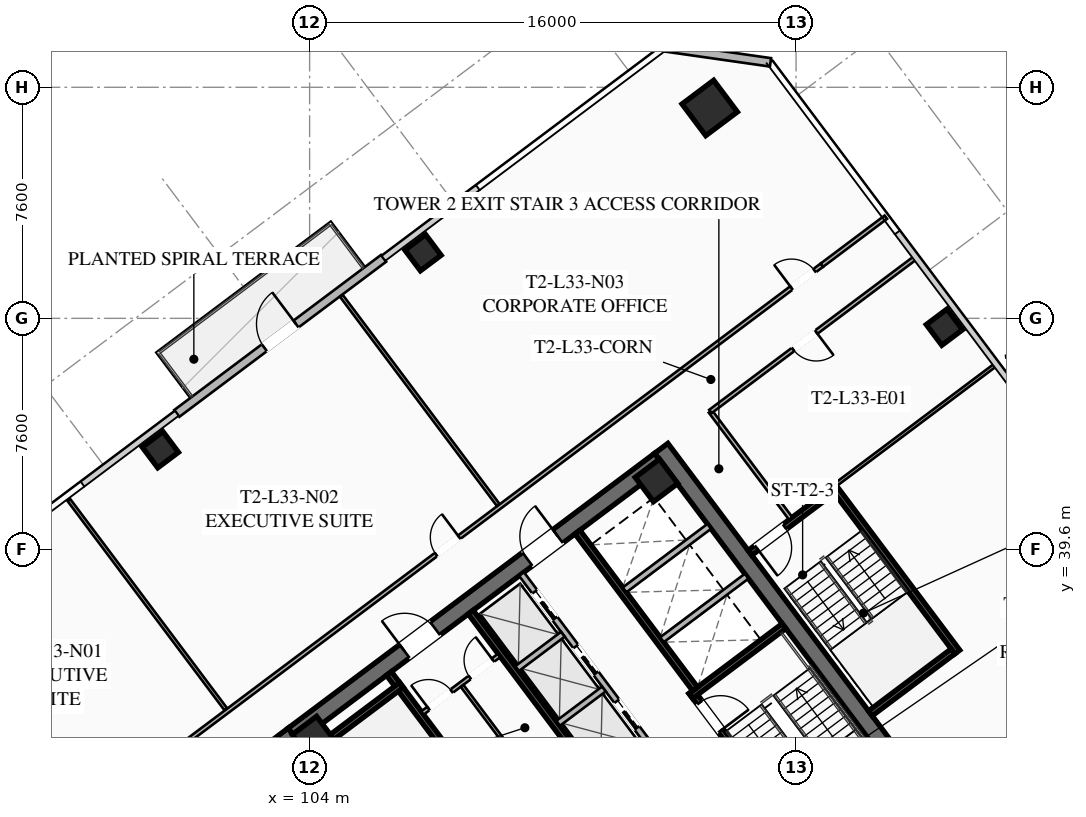
"""IFC4 building model, lengths in metres.
Left out: names, types, materials, properties, quantities, classifications, styles, units other than length and angle.
Written with IfcOpenShell. Run it as: python <this file> out.ifc"""

import sys

from ifc_helpers import new_model, si_unit, direction, frame, frame_2d, origin, origin_2d, place, context, subcontext, project, spatial, rectangle, hollow_rectangle, extrude, element, fill, save


model = new_model("IFC4")
c1 = context("Model", 3, precision=1e-05, world=origin(), true_north=direction((0.0, 1.0)))
c2 = subcontext(c1, "Body", "Model", "MODEL_VIEW")
j1 = project(units=[si_unit("LENGTHUNIT", "METRE"), si_unit("PLANEANGLEUNIT", "RADIAN")], contexts=[c1])
p1 = place(None, origin())
s1 = spatial("IfcSite", under=j1, at=p1, CompositionType="ELEMENT")
p2 = place(p1, origin())
s2 = spatial("IfcBuilding", under=s1, at=p2, CompositionType="ELEMENT")
p3 = place(p2, frame((0.0, 0.0, 125.05)))
s3 = spatial("IfcBuildingStorey", under=s2, at=p3, CompositionType="ELEMENT", Elevation=125.05)
for number, where, z_axis, x_axis in (
    (1, (112.436, 21.077, 0.0), (0.0, 0.0, 1.0), (-0.6, 0.8, 0.0)),
    (2, (115.564, 42.923, 0.0), (0.0, 0.0, 1.0), (0.6, -0.8, 0.0)),
):
    element("IfcWall", number, at=place(p3, frame(where, z_axis=z_axis, x_axis=x_axis)), inside=s3, PredefinedType="SHEAR", context=c2, shape_type="SweptSolid", body=[
        extrude(rectangle(XDim=15.6, YDim=0.55, at=frame_2d((7.8, 0.0))), origin(), (0.0, 0.0, 1.0), 3.55),
    ])
p4 = place(p3, frame((103.461, 33.502, 0.0), z_axis=(0.0, 0.0, 1.0), x_axis=(0.799998054672, 0.600002593761, 0.0)))
e3 = element("IfcWall", 3, at=p4, inside=s3, PredefinedType="SHEAR", context=c2, shape_type="SweptSolid", body=[
    extrude(rectangle(XDim=15.06, YDim=0.55, at=frame_2d((7.53, 0.0))), origin(), (0.0, 0.0, 1.0), 3.55),
])
p5 = place(p4, frame((4.58, 0.0, 0.0)))
e4 = element("IfcOpeningElement", 4, at=p5, cuts=e3, PredefinedType="OPENING", context=c2, shape_type="SweptSolid", body=[
    extrude(rectangle(XDim=1.25, YDim=2.25, at=frame_2d((0.625, 1.125))), frame((0.0, 0.285, 0.0), z_axis=(0.0, -1.0, 0.0), x_axis=(1.0, 0.0, 0.0)), (0.0, 0.0, 1.0), 0.57),
])
p6 = place(p4, frame((9.63, 0.0, 0.0)))
e5 = element("IfcOpeningElement", 5, at=p6, cuts=e3, PredefinedType="OPENING", context=c2, shape_type="SweptSolid", body=[
    extrude(rectangle(XDim=1.25, YDim=2.25, at=frame_2d((0.625, 1.125))), frame((0.0, 0.285, 0.0), z_axis=(0.0, -1.0, 0.0), x_axis=(1.0, 0.0, 0.0)), (0.0, 0.0, 1.0), 0.57),
])
for number, where, z_axis, x_axis in (
    (6, (115.41, 41.87, 0.0), (0.0, 0.0, 1.0), (0.8, 0.6, 0.0)),
    (7, (104.13, 33.41, 0.0), (0.0, 0.0, 1.0), (0.8, 0.6, 0.0)),
):
    element("IfcColumn", number, at=place(p3, frame(where, z_axis=z_axis, x_axis=x_axis)), inside=s3, PredefinedType="COLUMN", context=c2, shape_type="SweptSolid", body=[
        extrude(hollow_rectangle(XDim=1.0, YDim=1.0, WallThickness=0.04, at=origin_2d()), origin(), (0.0, 0.0, 1.0), 3.37),
    ])
p7 = place(p3, frame((117.16, 54.12, 0.0), z_axis=(0.0, 0.0, 1.0), x_axis=(0.799999996291, 0.600000004945, 0.0)))
e8 = element("IfcColumn", 8, at=p7, inside=s3, PredefinedType="COLUMN", context=c2, shape_type="SweptSolid", body=[
    extrude(hollow_rectangle(XDim=1.3, YDim=1.3, WallThickness=0.05, at=origin_2d()), origin(), (0.0, 0.0, 1.0), 3.37),
])
for number, where, z_axis, x_axis in (
    (9, (124.88, 46.91, 0.0), (0.0, 0.0, 1.0), (0.8, 0.6, 0.0)),
    (10, (107.73, 49.36, 0.0), (0.0, 0.0, 1.0), (0.8, 0.6, 0.0)),
    (11, (99.09, 42.88, 0.0), (0.0, 0.0, 1.0), (0.8, 0.6, 0.0)),
):
    element("IfcColumn", number, at=place(p3, frame(where, z_axis=z_axis, x_axis=x_axis)), inside=s3, PredefinedType="COLUMN", context=c2, shape_type="SweptSolid", body=[
        extrude(hollow_rectangle(XDim=0.85, YDim=0.85, WallThickness=0.035, at=origin_2d()), origin(), (0.0, 0.0, 1.0), 3.37),
    ])
p8 = place(p3, frame((99.632, 44.074, 0.0), z_axis=(0.0, 0.0, 1.0), x_axis=(0.799986212866, 0.600018382406, 0.0)))
e12 = element("IfcWall", 12, at=p8, inside=s3, PredefinedType="SOLIDWALL", context=c2, shape_type="SweptSolid", body=[
    extrude(rectangle(XDim=8.5, YDim=0.28, at=frame_2d((4.25, 0.0))), origin(), (0.0, 0.0, 1.0), 3.37),
])
p9 = place(p8, frame((3.6, 0.0, 0.0)))
e13 = element("IfcOpeningElement", 13, at=p9, cuts=e12, PredefinedType="OPENING", context=c2, shape_type="SweptSolid", body=[
    extrude(rectangle(XDim=1.3, YDim=2.15, at=frame_2d((0.65, 1.075))), frame((0.0, 0.15, 0.0), z_axis=(0.0, -1.0, 0.0), x_axis=(1.0, 0.0, 0.0)), (0.0, 0.0, 1.0), 0.3),
])
p10 = place(p3, frame((115.66, 56.12, 0.0), z_axis=(0.0, 0.0, 1.0), x_axis=(0.989949493661, -0.141421356237, 0.0)))
e14 = element("IfcWall", 14, at=p10, inside=s3, PredefinedType="SOLIDWALL", context=c2, shape_type="SweptSolid", body=[
    extrude(rectangle(XDim=3.536, YDim=0.28, at=frame_2d((1.768, 0.0))), origin(), (0.0, 0.0, 1.0), 3.37),
])
p11 = place(p3, frame((111.44, 29.08, 0.0), z_axis=(0.0, 0.0, 1.0), x_axis=(-0.59999029481, 0.8000072788, 0.0)))
e15 = element("IfcWall", 15, at=p11, inside=s3, PredefinedType="SHEAR", context=c2, shape_type="SweptSolid", body=[
    extrude(rectangle(XDim=8.05, YDim=0.2, at=frame_2d((4.025, 0.0))), origin(), (0.0, 0.0, 1.0), 3.37),
])
p12 = place(p11, frame((0.45, 0.0, 0.0)))
e16 = element("IfcOpeningElement", 16, at=p12, cuts=e15, PredefinedType="OPENING", context=c2, shape_type="SweptSolid", body=[
    extrude(rectangle(XDim=1.15, YDim=2.2, at=frame_2d((0.575, 1.1))), frame((0.0, 0.11, 0.0), z_axis=(0.0, -1.0, 0.0), x_axis=(1.0, 0.0, 0.0)), (0.0, 0.0, 1.0), 0.22),
])
p13 = place(p3, frame((103.956, 32.842, 0.0), z_axis=(0.0, 0.0, 1.0), x_axis=(0.800015298837, 0.599979601008, 0.0)))
e17 = element("IfcWall", 17, at=p13, inside=s3, PredefinedType="SHEAR", context=c2, shape_type="SweptSolid", body=[
    extrude(rectangle(XDim=3.83, YDim=0.2, at=frame_2d((1.915, 0.0))), origin(), (0.0, 0.0, 1.0), 3.37),
])
p14 = place(p3, frame((116.56, 34.92, 0.0), z_axis=(0.0, 0.0, 1.0), x_axis=(0.59999029481, -0.8000072788, 0.0)))
e18 = element("IfcWall", 18, at=p14, inside=s3, PredefinedType="SHEAR", context=c2, shape_type="SweptSolid", body=[
    extrude(rectangle(XDim=8.05, YDim=0.2, at=frame_2d((4.025, 0.0))), origin(), (0.0, 0.0, 1.0), 3.37),
])
p15 = place(p14, frame((0.45, 0.0, 0.0)))
e19 = element("IfcOpeningElement", 19, at=p15, cuts=e18, PredefinedType="OPENING", context=c2, shape_type="SweptSolid", body=[
    extrude(rectangle(XDim=1.15, YDim=2.2, at=frame_2d((0.575, 1.1))), frame((0.0, 0.11, 0.0), z_axis=(0.0, -1.0, 0.0), x_axis=(1.0, 0.0, 0.0)), (0.0, 0.0, 1.0), 0.22),
])
p16 = place(p3, frame((116.54, 34.78, 0.0), z_axis=(0.0, 0.0, 1.0), x_axis=(0.800015298837, 0.599979601008, 0.0)))
e20 = element("IfcWall", 20, at=p16, inside=s3, PredefinedType="SHEAR", context=c2, shape_type="SweptSolid", body=[
    extrude(rectangle(XDim=3.83, YDim=0.2, at=frame_2d((1.915, 0.0))), origin(), (0.0, 0.0, 1.0), 3.37),
])
p17 = place(p3, frame((117.998, 25.936, 0.0), z_axis=(0.0, 0.0, 1.0), x_axis=(-0.600002693989, 0.799997979501, 0.0)))
e21 = element("IfcWall", 21, at=p17, inside=s3, PredefinedType="SHEAR", context=c2, shape_type="SweptSolid", body=[
    extrude(rectangle(XDim=14.5, YDim=0.2, at=frame_2d((7.25, 0.0))), origin(), (0.0, 0.0, 1.0), 3.37),
])
p18 = place(p3, frame((112.81, 40.17, 0.0), z_axis=(0.0, 0.0, 1.0), x_axis=(0.599993943644, -0.800004542231, 0.0)))
e22 = element("IfcWall", 22, at=p18, inside=s3, PredefinedType="SHEAR", context=c2, shape_type="SweptSolid", body=[
    extrude(rectangle(XDim=6.45, YDim=0.2, at=frame_2d((3.225, 0.0))), origin(), (0.0, 0.0, 1.0), 3.37),
])
for number, where, z_axis, x_axis in (
    (23, (115.59, 36.63, 0.0), (0.0, 0.0, 1.0), (0.8, 0.6, 0.0)),
    (24, (114.36, 38.27, 0.0), (0.0, 0.0, 1.0), (0.8, 0.6, 0.0)),
):
    element("IfcWall", number, at=place(p3, frame(where, z_axis=z_axis, x_axis=x_axis)), inside=s3, PredefinedType="SOLIDWALL", context=c2, shape_type="SweptSolid", body=[
        extrude(rectangle(XDim=3.48, YDim=0.2, at=frame_2d((1.74, 0.0))), origin(), (0.0, 0.0, 1.0), 3.37),
    ])
p19 = place(p3, frame((107.71, 34.22, 0.0), z_axis=(0.0, 0.0, 1.0), x_axis=(0.799981399002, 0.60002480053, 0.0)))
e25 = element("IfcWall", 25, at=p19, inside=s3, PredefinedType="PARTITIONING", context=c2, shape_type="SweptSolid", body=[
    extrude(rectangle(XDim=3.15, YDim=0.135, at=frame_2d((1.575, 0.0))), origin(), (0.0, 0.0, 1.0), 2.723),
])
p20 = place(p19, frame((0.25, 0.0, 0.0)))
e26 = element("IfcOpeningElement", 26, at=p20, cuts=e25, PredefinedType="OPENING", context=c2, shape_type="SweptSolid", body=[
    extrude(rectangle(XDim=0.95, YDim=2.05, at=frame_2d((0.475, 1.025))), frame((0.0, 0.077, 0.0), z_axis=(0.0, -1.0, 0.0), x_axis=(1.0, 0.0, 0.0)), (0.0, 0.0, 1.0), 0.155),
])
p21 = place(p19, frame((1.95, 0.0, 0.0)))
e27 = element("IfcOpeningElement", 27, at=p21, cuts=e25, PredefinedType="OPENING", context=c2, shape_type="SweptSolid", body=[
    extrude(rectangle(XDim=0.95, YDim=2.05, at=frame_2d((0.475, 1.025))), frame((0.0, 0.077, 0.0), z_axis=(0.0, -1.0, 0.0), x_axis=(1.0, 0.0, 0.0)), (0.0, 0.0, 1.0), 0.155),
])
p22 = place(p3, frame((111.296, 32.072, 0.0), z_axis=(0.0, 0.0, 1.0), x_axis=(-0.59995887973, 0.800030838552, 0.0)))
e28 = element("IfcWall", 28, at=p22, inside=s3, PredefinedType="PARTITIONING", context=c2, shape_type="SweptSolid", body=[
    extrude(rectangle(XDim=3.8, YDim=0.11, at=frame_2d((1.9, 0.0))), origin(), (0.0, 0.0, 1.0), 2.723),
])
p23 = place(p3, frame((115.11, 33.27, 0.0), z_axis=(0.0, 0.0, 1.0), x_axis=(-0.600011322243, 0.799991508192, 0.0)))
e29 = element("IfcWall", 29, at=p23, inside=s3, PredefinedType="SOLIDWALL", context=c2, shape_type="SweptSolid", body=[
    extrude(rectangle(XDim=6.9, YDim=0.2, at=frame_2d((3.45, 0.0))), origin(), (0.0, 0.0, 1.0), 3.37),
])
p24 = place(p23, frame((0.575, 0.0, 0.0)))
e30 = element("IfcOpeningElement", 30, at=p24, cuts=e29, PredefinedType="OPENING", context=c2, shape_type="SweptSolid", body=[
    extrude(rectangle(XDim=1.1, YDim=2.2, at=frame_2d((0.55, 1.1))), frame((0.0, 0.11, 0.0), z_axis=(0.0, -1.0, 0.0), x_axis=(1.0, 0.0, 0.0)), (0.0, 0.0, 1.0), 0.22),
])
p25 = place(p23, frame((2.825, 0.0, 0.0)))
e31 = element("IfcOpeningElement", 31, at=p25, cuts=e29, PredefinedType="OPENING", context=c2, shape_type="SweptSolid", body=[
    extrude(rectangle(XDim=1.1, YDim=2.2, at=frame_2d((0.55, 1.1))), frame((0.0, 0.11, 0.0), z_axis=(0.0, -1.0, 0.0), x_axis=(1.0, 0.0, 0.0)), (0.0, 0.0, 1.0), 0.22),
])
p26 = place(p23, frame((5.075, 0.0, 0.0)))
e32 = element("IfcOpeningElement", 32, at=p26, cuts=e29, PredefinedType="OPENING", context=c2, shape_type="SweptSolid", body=[
    extrude(rectangle(XDim=1.1, YDim=2.2, at=frame_2d((0.55, 1.1))), frame((0.0, 0.11, 0.0), z_axis=(0.0, -1.0, 0.0), x_axis=(1.0, 0.0, 0.0)), (0.0, 0.0, 1.0), 0.22),
])
p27 = place(p3, frame((112.176, 33.882, 0.0), z_axis=(0.0, 0.0, 1.0), x_axis=(0.8, 0.6, 0.0)))
e33 = element("IfcWall", 33, at=p27, inside=s3, PredefinedType="SOLIDWALL", context=c2, shape_type="SweptSolid", body=[
    extrude(rectangle(XDim=1.88, YDim=0.2, at=frame_2d((0.94, 0.0))), origin(), (0.0, 0.0, 1.0), 3.37),
])
p28 = place(p3, frame((110.826, 35.682, 0.0), z_axis=(0.0, 0.0, 1.0), x_axis=(0.799984418148, 0.600020775241, 0.0)))
e34 = element("IfcWall", 34, at=p28, inside=s3, PredefinedType="SOLIDWALL", context=c2, shape_type="SweptSolid", body=[
    extrude(rectangle(XDim=1.88, YDim=0.2, at=frame_2d((0.94, 0.0))), origin(), (0.0, 0.0, 1.0), 3.37),
])
p29 = place(p3, frame((125.304, 36.228, 0.0), z_axis=(0.0, 0.0, 1.0), x_axis=(-0.59998851072, 0.800008616831, 0.0)))
e35 = element("IfcWall", 35, at=p29, inside=s3, PredefinedType="SHEAR", context=c2, shape_type="SweptSolid", body=[
    extrude(rectangle(XDim=6.8, YDim=0.2, at=frame_2d((3.4, 0.0))), origin(), (0.0, 0.0, 1.0), 3.37),
])
p30 = place(p3, frame((121.204, 41.528, 0.0), z_axis=(0.0, 0.0, 1.0), x_axis=(-0.800017232136, -0.599977023131, 0.0)))
e36 = element("IfcWall", 36, at=p30, inside=s3, PredefinedType="SHEAR", context=c2, shape_type="SweptSolid", body=[
    extrude(rectangle(XDim=3.4, YDim=0.2, at=frame_2d((1.7, 0.0))), origin(), (0.0, 0.0, 1.0), 3.37),
])
p31 = place(p30, frame((1.975, 0.0, 0.0)))
e37 = element("IfcOpeningElement", 37, at=p31, cuts=e36, PredefinedType="OPENING", context=c2, shape_type="SweptSolid", body=[
    extrude(rectangle(XDim=1.15, YDim=2.2, at=frame_2d((0.575, 1.1))), frame((0.0, 0.11, 0.0), z_axis=(0.0, -1.0, 0.0), x_axis=(1.0, 0.0, 0.0)), (0.0, 0.0, 1.0), 0.22),
])
p32 = place(p3, frame((122.444, 34.208, 0.0), z_axis=(0.0, 0.0, 1.0), x_axis=(0.79999138319, 0.600011488909, 0.0)))
e38 = element("IfcWall", 38, at=p32, inside=s3, PredefinedType="SHEAR", context=c2, shape_type="SweptSolid", body=[
    extrude(rectangle(XDim=3.4, YDim=0.2, at=frame_2d((1.7, 0.0))), origin(), (0.0, 0.0, 1.0), 3.37),
])
p33 = place(p3, frame((119.824, 40.618, 0.0), z_axis=(0.0, 0.0, 1.0), x_axis=(-0.599982243973, 0.800013316712, 0.0)))
e39 = element("IfcWall", 39, at=p33, inside=s3, PredefinedType="PARTITIONING", context=c2, shape_type="SweptSolid", body=[
    extrude(rectangle(XDim=4.4, YDim=0.135, at=frame_2d((2.2, 0.0))), origin(), (0.0, 0.0, 1.0), 2.723),
])
p34 = place(p3, frame((95.81, 30.17, 0.0), z_axis=(0.0, 0.0, 1.0), x_axis=(0.8, 0.6, 0.0)))
e40 = element("IfcWall", 40, at=p34, inside=s3, PredefinedType="PARTITIONING", context=c2, shape_type="SweptSolid", body=[
    extrude(rectangle(XDim=31.3, YDim=0.135, at=frame_2d((15.65, 0.0))), origin(), (0.0, 0.0, 1.0), 2.723),
])
p35 = place(p34, frame((0.3, 0.0, 0.0)))
e41 = element("IfcOpeningElement", 41, at=p35, cuts=e40, PredefinedType="OPENING", context=c2, shape_type="SweptSolid", body=[
    extrude(rectangle(XDim=0.95, YDim=2.05, at=frame_2d((0.475, 1.025))), frame((0.0, 0.077, 0.0), z_axis=(0.0, -1.0, 0.0), x_axis=(1.0, 0.0, 0.0)), (0.0, 0.0, 1.0), 0.155),
])
p36 = place(p34, frame((15.438, 0.0, 0.0)))
e42 = element("IfcOpeningElement", 42, at=p36, cuts=e40, PredefinedType="OPENING", context=c2, shape_type="SweptSolid", body=[
    extrude(rectangle(XDim=0.95, YDim=2.05, at=frame_2d((0.475, 1.025))), frame((0.0, 0.077, 0.0), z_axis=(0.0, -1.0, 0.0), x_axis=(1.0, 0.0, 0.0)), (0.0, 0.0, 1.0), 0.155),
])
p37 = place(p34, frame((30.05, 0.0, 0.0)))
e43 = element("IfcOpeningElement", 43, at=p37, cuts=e40, PredefinedType="OPENING", context=c2, shape_type="SweptSolid", body=[
    extrude(rectangle(XDim=0.95, YDim=2.05, at=frame_2d((0.475, 1.025))), frame((0.0, 0.077, 0.0), z_axis=(0.0, -1.0, 0.0), x_axis=(1.0, 0.0, 0.0)), (0.0, 0.0, 1.0), 0.155),
])
p38 = place(p3, frame((120.85, 48.95, 0.0), z_axis=(0.0, 0.0, 1.0), x_axis=(0.799977721118, 0.600029704027, 0.0)))
e44 = element("IfcWall", 44, at=p38, inside=s3, PredefinedType="PARTITIONING", context=c2, shape_type="SweptSolid", body=[
    extrude(rectangle(XDim=2.63, YDim=0.135, at=frame_2d((1.315, 0.0))), origin(), (0.0, 0.0, 1.0), 2.723),
])
for number, where, z_axis, x_axis in (
    (45, (101.242, 34.344, 0.0), (0.0, 0.0, 1.0), (-0.6, 0.8, 0.0)),
    (46, (110.202, 41.064, 0.0), (0.0, 0.0, 1.0), (-0.6, 0.8, 0.0)),
):
    element("IfcWall", number, at=place(p3, frame(where, z_axis=z_axis, x_axis=x_axis)), inside=s3, PredefinedType="PARTITIONING", context=c2, shape_type="SweptSolid", body=[
        extrude(rectangle(XDim=8.6, YDim=0.11, at=frame_2d((4.3, 0.0))), origin(), (0.0, 0.0, 1.0), 2.723),
    ])
p39 = place(p3, frame((123.944, 49.208, 0.0), z_axis=(0.0, 0.0, 1.0), x_axis=(-0.799996532921, -0.600004622744, 0.0)))
e47 = element("IfcWall", 47, at=p39, inside=s3, PredefinedType="PARTITIONING", context=c2, shape_type="SweptSolid", body=[
    extrude(rectangle(XDim=8.45, YDim=0.135, at=frame_2d((4.225, 0.0))), origin(), (0.0, 0.0, 1.0), 2.723),
])
p40 = place(p39, frame((4.1, 0.0, 0.0)))
e48 = element("IfcOpeningElement", 48, at=p40, cuts=e47, PredefinedType="OPENING", context=c2, shape_type="SweptSolid", body=[
    extrude(rectangle(XDim=0.95, YDim=2.05, at=frame_2d((0.475, 1.025))), frame((0.0, 0.077, 0.0), z_axis=(0.0, -1.0, 0.0), x_axis=(1.0, 0.0, 0.0)), (0.0, 0.0, 1.0), 0.155),
])
p41 = place(p3, frame((125.208, 30.656, 0.0), z_axis=(0.0, 0.0, 1.0), x_axis=(0.799997105034, 0.600003859935, 0.0)))
e49 = element("IfcWall", 49, at=p41, inside=s3, PredefinedType="PARTITIONING", context=c2, shape_type="SweptSolid", body=[
    extrude(rectangle(XDim=10.12, YDim=0.135, at=frame_2d((5.06, 0.0))), origin(), (0.0, 0.0, 1.0), 2.723),
])
p42 = place(p41, frame((2.045, 0.0, 0.0)))
e50 = element("IfcOpeningElement", 50, at=p42, cuts=e49, PredefinedType="OPENING", context=c2, shape_type="SweptSolid", body=[
    extrude(rectangle(XDim=0.95, YDim=2.05, at=frame_2d((0.475, 1.025))), frame((0.0, 0.077, 0.0), z_axis=(0.0, -1.0, 0.0), x_axis=(1.0, 0.0, 0.0)), (0.0, 0.0, 1.0), 0.155),
])
p43 = place(p3, frame((126.584, 45.688, 0.0), z_axis=(0.0, 0.0, 1.0), x_axis=(-0.800004438899, -0.599994081423, 0.0)))
e51 = element("IfcWall", 51, at=p43, inside=s3, PredefinedType="PARTITIONING", context=c2, shape_type="SweptSolid", body=[
    extrude(rectangle(XDim=6.6, YDim=0.11, at=frame_2d((3.3, 0.0))), origin(), (0.0, 0.0, 1.0), 2.723),
])
p44 = place(p9, origin())
e52 = element("IfcDoor", 52, at=p44, inside=s3, OperationType="SINGLE_SWING_RIGHT", PredefinedType="DOOR", context=c2, shape_type="SweptSolid", body=[
    extrude(rectangle(XDim=1.3, YDim=2.15, at=frame_2d((0.65, 1.075))), frame((0.0, 0.025, 0.0), z_axis=(0.0, -1.0, 0.0), x_axis=(1.0, 0.0, 0.0)), (0.0, 0.0, 1.0), 0.05),
])
fill(e13, e52)
p45 = place(p5, origin())
e53 = element("IfcDoor", 53, at=p45, inside=s3, OperationType="SINGLE_SWING_LEFT", PredefinedType="DOOR", context=c2, shape_type="SweptSolid", body=[
    extrude(rectangle(XDim=1.25, YDim=2.25, at=frame_2d((0.625, 1.125))), frame((0.0, 0.025, 0.0), z_axis=(0.0, -1.0, 0.0), x_axis=(1.0, 0.0, 0.0)), (0.0, 0.0, 1.0), 0.05),
])
fill(e4, e53)
p46 = place(p6, origin())
e54 = element("IfcDoor", 54, at=p46, inside=s3, OperationType="SINGLE_SWING_RIGHT", PredefinedType="DOOR", context=c2, shape_type="SweptSolid", body=[
    extrude(rectangle(XDim=1.25, YDim=2.25, at=frame_2d((0.625, 1.125))), frame((0.0, 0.025, 0.0), z_axis=(0.0, -1.0, 0.0), x_axis=(1.0, 0.0, 0.0)), (0.0, 0.0, 1.0), 0.05),
])
fill(e5, e54)
p47 = place(p15, origin())
e55 = element("IfcDoor", 55, at=p47, inside=s3, OperationType="SINGLE_SWING_RIGHT", PredefinedType="DOOR", context=c2, shape_type="SweptSolid", body=[
    extrude(rectangle(XDim=1.15, YDim=2.2, at=frame_2d((0.575, 1.1))), frame((0.0, 0.025, 0.0), z_axis=(0.0, -1.0, 0.0), x_axis=(1.0, 0.0, 0.0)), (0.0, 0.0, 1.0), 0.05),
])
fill(e19, e55)
p48 = place(p20, origin())
e56 = element("IfcDoor", 56, at=p48, inside=s3, OperationType="SINGLE_SWING_LEFT", PredefinedType="DOOR", context=c2, shape_type="SweptSolid", body=[
    extrude(rectangle(XDim=0.95, YDim=2.05, at=frame_2d((0.475, 1.025))), frame((0.0, 0.025, 0.0), z_axis=(0.0, -1.0, 0.0), x_axis=(1.0, 0.0, 0.0)), (0.0, 0.0, 1.0), 0.05),
])
fill(e26, e56)
p49 = place(p21, origin())
e57 = element("IfcDoor", 57, at=p49, inside=s3, OperationType="SINGLE_SWING_RIGHT", PredefinedType="DOOR", context=c2, shape_type="SweptSolid", body=[
    extrude(rectangle(XDim=0.95, YDim=2.05, at=frame_2d((0.475, 1.025))), frame((0.0, 0.025, 0.0), z_axis=(0.0, -1.0, 0.0), x_axis=(1.0, 0.0, 0.0)), (0.0, 0.0, 1.0), 0.05),
])
fill(e27, e57)
p50 = place(p31, origin())
e58 = element("IfcDoor", 58, at=p50, inside=s3, OperationType="SINGLE_SWING_RIGHT", PredefinedType="DOOR", context=c2, shape_type="SweptSolid", body=[
    extrude(rectangle(XDim=1.15, YDim=2.2, at=frame_2d((0.575, 1.1))), frame((0.0, 0.025, 0.0), z_axis=(0.0, -1.0, 0.0), x_axis=(1.0, 0.0, 0.0)), (0.0, 0.0, 1.0), 0.05),
])
fill(e37, e58)
p51 = place(p36, origin())
e59 = element("IfcDoor", 59, at=p51, inside=s3, OperationType="SINGLE_SWING_RIGHT", PredefinedType="DOOR", context=c2, shape_type="SweptSolid", body=[
    extrude(rectangle(XDim=0.95, YDim=2.05, at=frame_2d((0.475, 1.025))), frame((0.0, 0.025, 0.0), z_axis=(0.0, -1.0, 0.0), x_axis=(1.0, 0.0, 0.0)), (0.0, 0.0, 1.0), 0.05),
])
fill(e42, e59)
p52 = place(p37, origin())
e60 = element("IfcDoor", 60, at=p52, inside=s3, OperationType="SINGLE_SWING_LEFT", PredefinedType="DOOR", context=c2, shape_type="SweptSolid", body=[
    extrude(rectangle(XDim=0.95, YDim=2.05, at=frame_2d((0.475, 1.025))), frame((0.0, 0.025, 0.0), z_axis=(0.0, -1.0, 0.0), x_axis=(1.0, 0.0, 0.0)), (0.0, 0.0, 1.0), 0.05),
])
fill(e43, e60)
p53 = place(p40, origin())
e61 = element("IfcDoor", 61, at=p53, inside=s3, OperationType="SINGLE_SWING_LEFT", PredefinedType="DOOR", context=c2, shape_type="SweptSolid", body=[
    extrude(rectangle(XDim=0.95, YDim=2.05, at=frame_2d((0.475, 1.025))), frame((0.0, 0.025, 0.0), z_axis=(0.0, -1.0, 0.0), x_axis=(1.0, 0.0, 0.0)), (0.0, 0.0, 1.0), 0.05),
])
fill(e48, e61)
p54 = place(p24, origin())
e62 = element("IfcDoor", 62, at=p54, inside=s3, OperationType="SLIDING_TO_LEFT", PredefinedType="DOOR", context=c2, shape_type="SweptSolid", body=[
    extrude(rectangle(XDim=1.1, YDim=2.2, at=frame_2d((0.55, 1.1))), frame((0.0, 0.025, 0.0), z_axis=(0.0, -1.0, 0.0), x_axis=(1.0, 0.0, 0.0)), (0.0, 0.0, 1.0), 0.05),
])
fill(e30, e62)
p55 = place(p25, origin())
e63 = element("IfcDoor", 63, at=p55, inside=s3, OperationType="SLIDING_TO_LEFT", PredefinedType="DOOR", context=c2, shape_type="SweptSolid", body=[
    extrude(rectangle(XDim=1.1, YDim=2.2, at=frame_2d((0.55, 1.1))), frame((0.0, 0.025, 0.0), z_axis=(0.0, -1.0, 0.0), x_axis=(1.0, 0.0, 0.0)), (0.0, 0.0, 1.0), 0.05),
])
fill(e31, e63)
p56 = place(p26, origin())
e64 = element("IfcDoor", 64, at=p56, inside=s3, OperationType="SLIDING_TO_LEFT", PredefinedType="DOOR", context=c2, shape_type="SweptSolid", body=[
    extrude(rectangle(XDim=1.1, YDim=2.2, at=frame_2d((0.55, 1.1))), frame((0.0, 0.025, 0.0), z_axis=(0.0, -1.0, 0.0), x_axis=(1.0, 0.0, 0.0)), (0.0, 0.0, 1.0), 0.05),
])
fill(e32, e64)
save(model, sys.argv[1])
